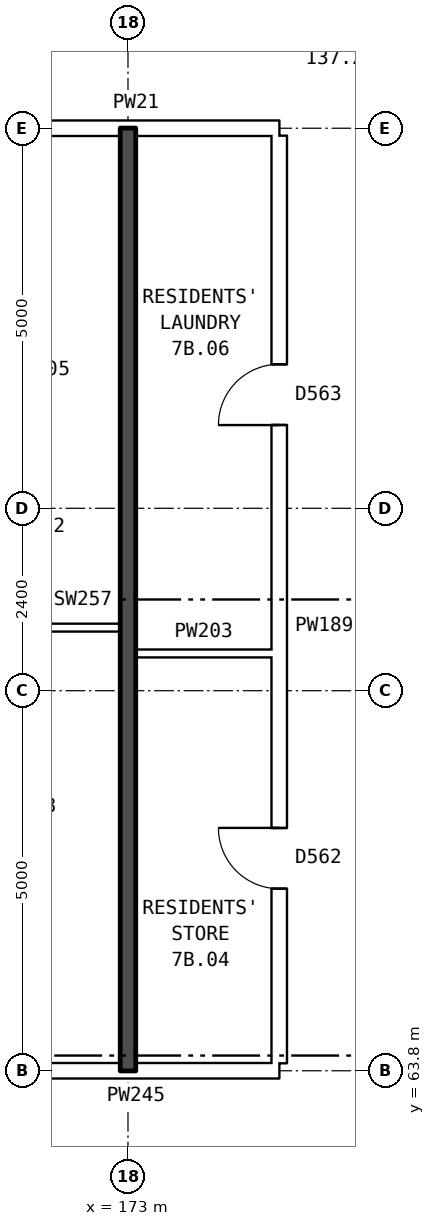
"""IFC4 building model, lengths in metres.
Left out: names, types, materials, properties, quantities, classifications, styles, units other than length and angle.
Written with IfcOpenShell. Run it as: python <this file> out.ifc"""

import sys

from ifc_helpers import new_model, si_unit, direction, frame, frame_2d, origin, place, context, subcontext, project, spatial, rectangle, extrude, element, fill, save


model = new_model("IFC4")
c1 = context("Model", 3, precision=1e-05, world=origin(), true_north=direction((0.0, 1.0)))
c2 = subcontext(c1, "Body", "Model", "MODEL_VIEW")
j1 = project(units=[si_unit("LENGTHUNIT", "METRE"), si_unit("PLANEANGLEUNIT", "RADIAN")], contexts=[c1])
p1 = place(None, origin())
s1 = spatial("IfcSite", under=j1, at=p1, CompositionType="ELEMENT")
p2 = place(p1, origin())
s2 = spatial("IfcBuilding", under=s1, at=p2, CompositionType="ELEMENT")
p3 = place(p2, frame((0.0, 0.0, 28.8)))
s3 = spatial("IfcBuildingStorey", under=s2, at=p3, CompositionType="ELEMENT", Elevation=28.8)
p4 = place(p3, frame((168.64, 63.8, 0.0), z_axis=(0.0, 0.0, 1.0), x_axis=(1.0, 0.0, 0.0)))
e1 = element("IfcWall", 1, at=p4, inside=s3, PredefinedType="PARTITIONING", context=c2, shape_type="SweptSolid", body=[
    extrude(rectangle(XDim=6.35, YDim=0.2, at=frame_2d((3.175, 0.0))), origin(), (0.0, 0.0, 1.0), 2.85),
])
p5 = place(p4, frame((1.78, 0.0, 0.0)))
e2 = element("IfcOpeningElement", 2, at=p5, cuts=e1, PredefinedType="OPENING", context=c2, shape_type="SweptSolid", body=[
    extrude(rectangle(XDim=0.8, YDim=2.1, at=frame_2d((0.4, 1.05))), frame((0.0, 0.11, 0.0), z_axis=(0.0, -1.0, 0.0), x_axis=(1.0, 0.0, 0.0)), (0.0, 0.0, 1.0), 0.22),
])
p6 = place(p3, frame((173.1, 69.29, 0.0), z_axis=(0.0, 0.0, 1.0), x_axis=(1.0, 0.0, 0.0)))
e3 = element("IfcWall", 3, at=p6, inside=s3, PredefinedType="PARTITIONING", context=c2, shape_type="SweptSolid", body=[
    extrude(rectangle(XDim=1.79, YDim=0.1, at=frame_2d((0.895, 0.0))), origin(), (0.0, 0.0, 1.0), 2.85),
])
p7 = place(p3, frame((168.64, 69.63, 0.0), z_axis=(0.0, 0.0, 1.0), x_axis=(1.0, 0.0, 0.0)))
e4 = element("IfcWall", 4, at=p7, inside=s3, PredefinedType="PARTITIONING", context=c2, shape_type="SweptSolid", body=[
    extrude(rectangle(XDim=4.26, YDim=0.1, at=frame_2d((2.13, 0.0))), origin(), (0.0, 0.0, 1.0), 2.85),
])
p8 = place(p3, frame((168.64, 76.2, 0.0), z_axis=(0.0, 0.0, 1.0), x_axis=(1.0, 0.0, 0.0)))
e5 = element("IfcWall", 5, at=p8, inside=s3, PredefinedType="PARTITIONING", context=c2, shape_type="SweptSolid", body=[
    extrude(rectangle(XDim=6.35, YDim=0.2, at=frame_2d((3.175, 0.0))), origin(), (0.0, 0.0, 1.0), 2.85),
])
p9 = place(p8, frame((1.78, 0.0, 0.0)))
e6 = element("IfcOpeningElement", 6, at=p9, cuts=e5, PredefinedType="OPENING", context=c2, shape_type="SweptSolid", body=[
    extrude(rectangle(XDim=0.8, YDim=2.1, at=frame_2d((0.4, 1.05))), frame((0.0, 0.11, 0.0), z_axis=(0.0, -1.0, 0.0), x_axis=(1.0, 0.0, 0.0)), (0.0, 0.0, 1.0), 0.22),
])
p10 = place(p3, frame((173.0, 63.8, 0.0), z_axis=(0.0, 0.0, 1.0), x_axis=(0.0, 1.0, 0.0)))
e7 = element("IfcWall", 7, at=p10, inside=s3, PredefinedType="SOLIDWALL", context=c2, shape_type="SweptSolid", body=[
    extrude(rectangle(XDim=12.4, YDim=0.2, at=frame_2d((6.2, 0.0))), origin(), (0.0, 0.0, 1.0), 2.85),
])
p11 = place(p3, frame((174.99, 63.9, 0.0), z_axis=(0.0, 0.0, 1.0), x_axis=(0.0, 1.0, 0.0)))
e8 = element("IfcWall", 8, at=p11, inside=s3, PredefinedType="PARTITIONING", context=c2, shape_type="SweptSolid", body=[
    extrude(rectangle(XDim=12.2, YDim=0.2, at=frame_2d((6.1, 0.0))), origin(), (0.0, 0.0, 1.0), 2.85),
])
p12 = place(p11, frame((2.295, 0.0, 0.0)))
e9 = element("IfcOpeningElement", 9, at=p12, cuts=e8, PredefinedType="OPENING", context=c2, shape_type="SweptSolid", body=[
    extrude(rectangle(XDim=0.8, YDim=2.1, at=frame_2d((0.4, 1.05))), frame((0.0, 0.11, 0.0), z_axis=(0.0, -1.0, 0.0), x_axis=(1.0, 0.0, 0.0)), (0.0, 0.0, 1.0), 0.22),
])
p13 = place(p11, frame((8.395, 0.0, 0.0)))
e10 = element("IfcOpeningElement", 10, at=p13, cuts=e8, PredefinedType="OPENING", context=c2, shape_type="SweptSolid", body=[
    extrude(rectangle(XDim=0.8, YDim=2.1, at=frame_2d((0.4, 1.05))), frame((0.0, 0.11, 0.0), z_axis=(0.0, -1.0, 0.0), x_axis=(1.0, 0.0, 0.0)), (0.0, 0.0, 1.0), 0.22),
])
p14 = place(p12, origin())
e11 = element("IfcDoor", 11, at=p14, inside=s3, OperationType="SINGLE_SWING_RIGHT", PredefinedType="DOOR", context=c2, shape_type="SweptSolid", body=[
    extrude(rectangle(XDim=0.8, YDim=2.1, at=frame_2d((0.4, 1.05))), frame((0.0, 0.025, 0.0), z_axis=(0.0, -1.0, 0.0), x_axis=(1.0, 0.0, 0.0)), (0.0, 0.0, 1.0), 0.05),
])
fill(e9, e11)
p15 = place(p13, origin())
e12 = element("IfcDoor", 12, at=p15, inside=s3, OperationType="SINGLE_SWING_LEFT", PredefinedType="DOOR", context=c2, shape_type="SweptSolid", body=[
    extrude(rectangle(XDim=0.8, YDim=2.1, at=frame_2d((0.4, 1.05))), frame((0.0, 0.025, 0.0), z_axis=(0.0, -1.0, 0.0), x_axis=(1.0, 0.0, 0.0)), (0.0, 0.0, 1.0), 0.05),
])
fill(e10, e12)
save(model, sys.argv[1])
